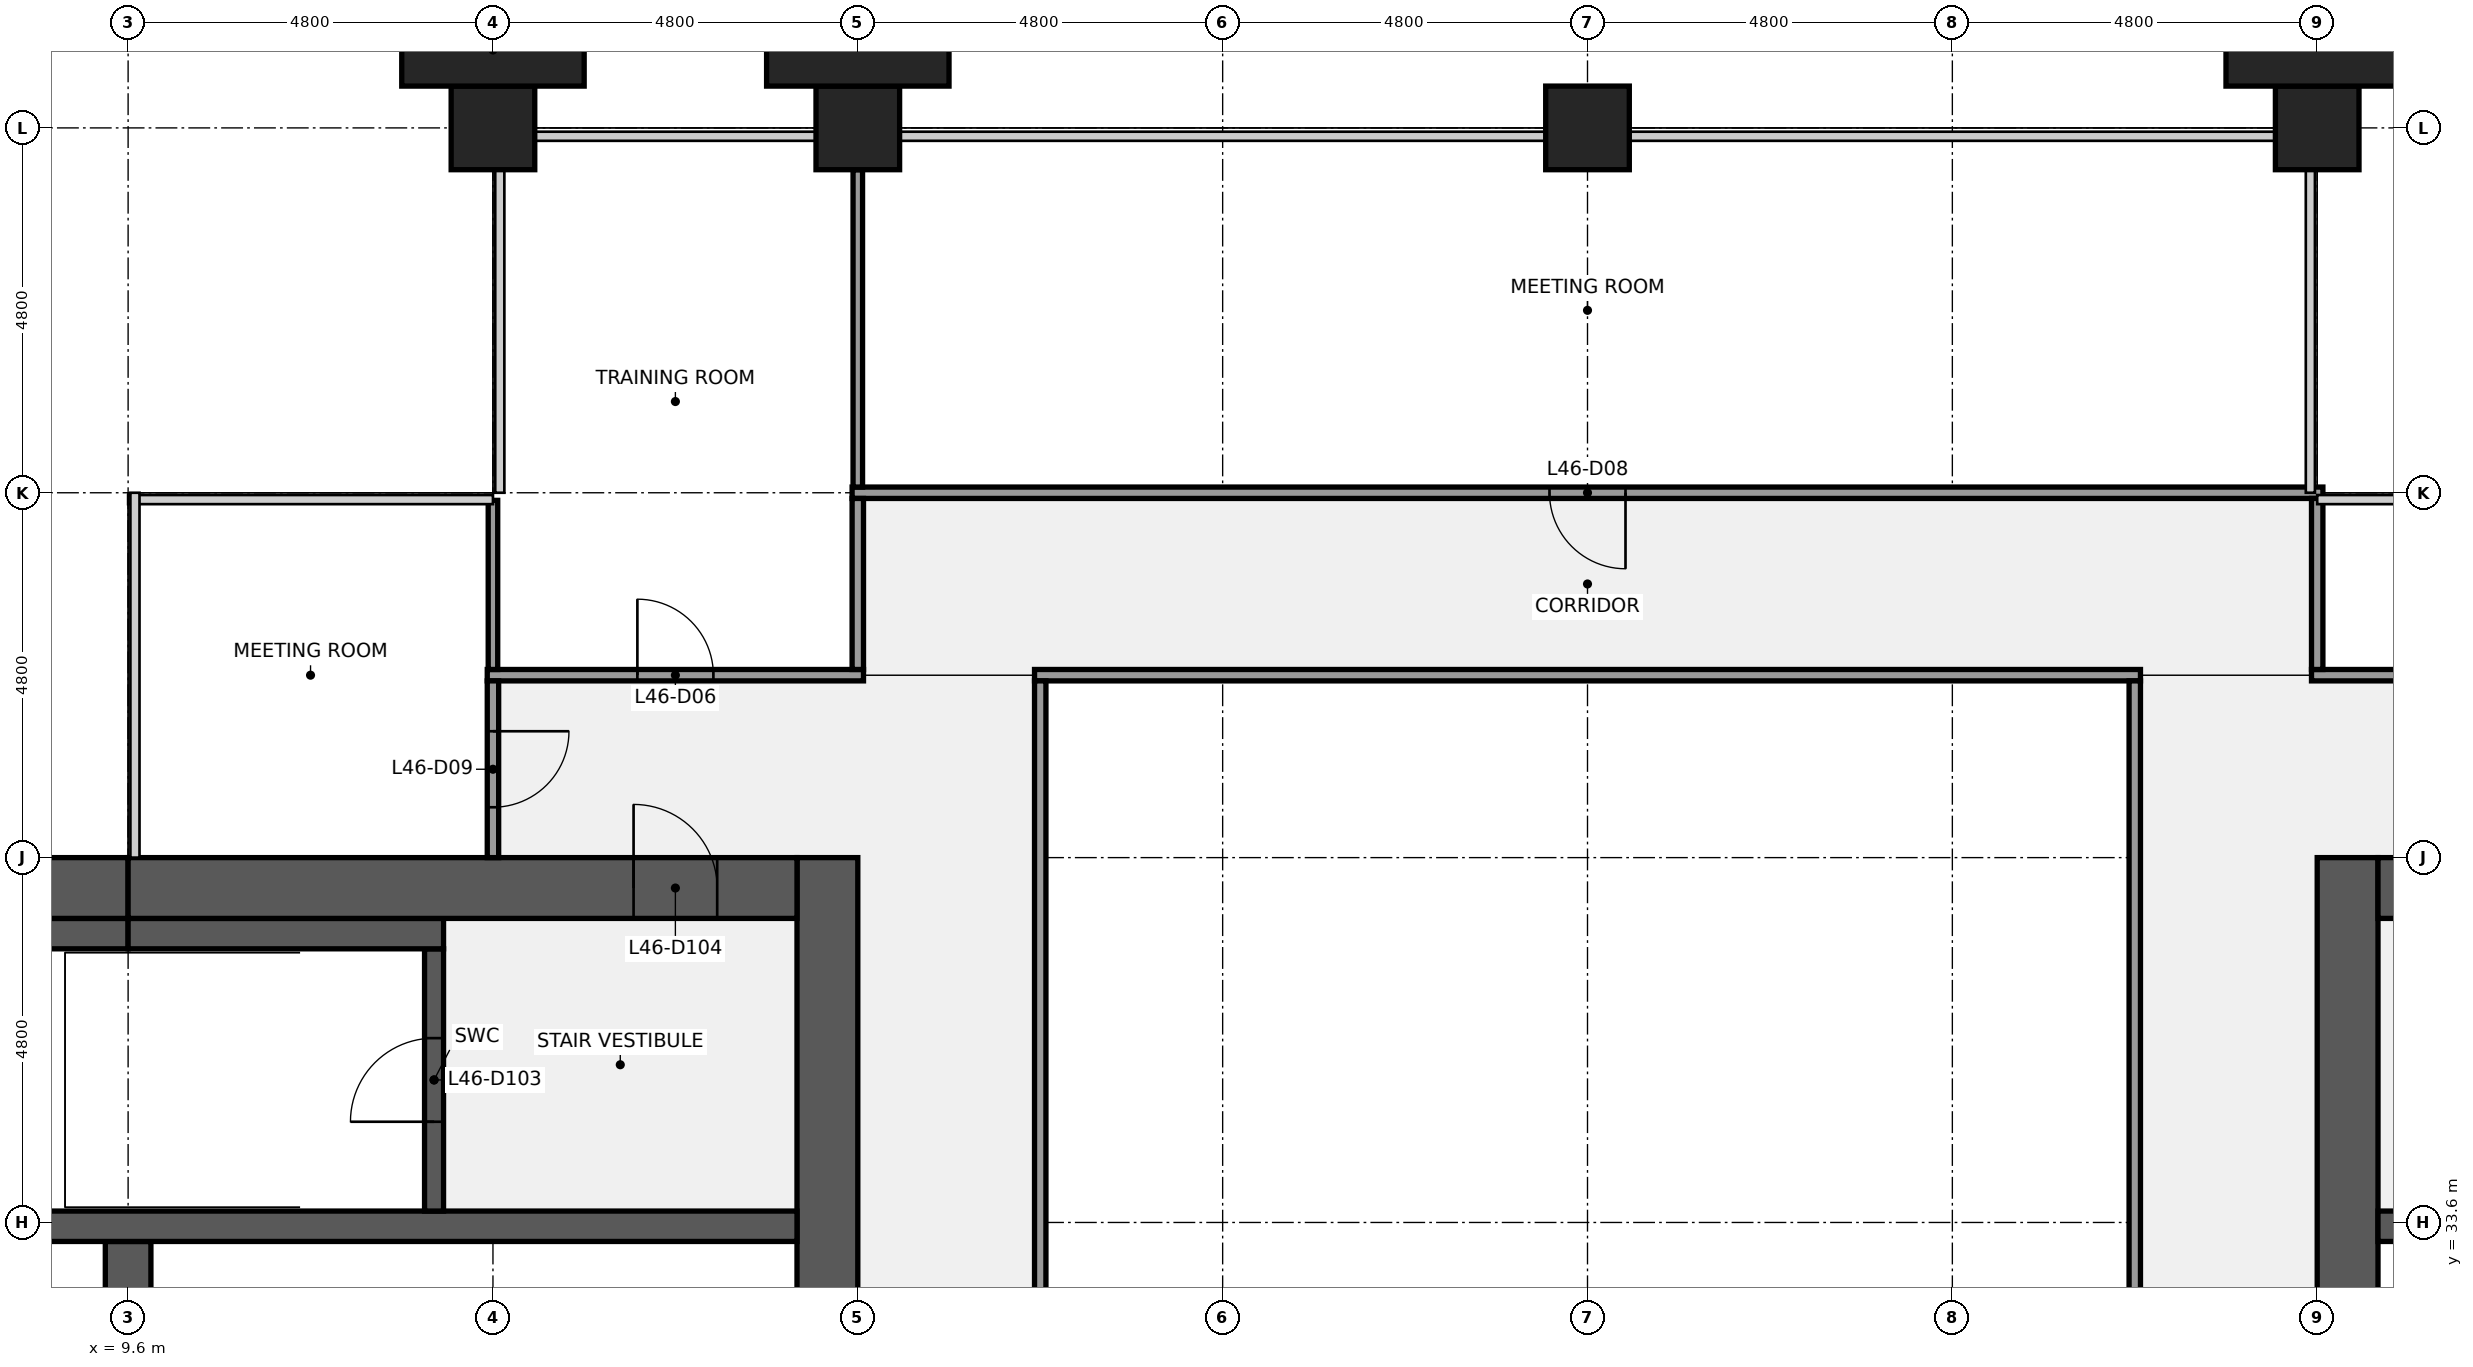
"""IFC4 building model, lengths in metres.
Left out: names, types, materials, properties, quantities, classifications, styles, units other than length and angle.
Written with IfcOpenShell. Run it as: python <this file> out.ifc"""

import sys

from ifc_helpers import new_model, si_unit, direction, frame, frame_2d, origin, origin_2d, place, context, subcontext, project, spatial, rectangle, extrude, element, fill, save


model = new_model("IFC4")
c1 = context("Model", 3, precision=1e-05, world=origin(), true_north=direction((0.0, 1.0)))
c2 = subcontext(c1, "Body", "Model", "MODEL_VIEW")
j1 = project(units=[si_unit("LENGTHUNIT", "METRE"), si_unit("PLANEANGLEUNIT", "RADIAN")], contexts=[c1])
p1 = place(None, origin())
s1 = spatial("IfcSite", under=j1, at=p1, CompositionType="ELEMENT")
p2 = place(p1, origin())
s2 = spatial("IfcBuilding", under=s1, at=p2, CompositionType="ELEMENT")
p3 = place(p2, frame((0.0, 0.0, 213.2)))
s3 = spatial("IfcBuildingStorey", under=s2, at=p3, CompositionType="ELEMENT", Elevation=213.2)
for number, where, z_axis, x_axis in (
    (1, (14.4, 48.0, 0.0), (0.0, 0.0, 1.0), (1.0, 0.0, 0.0)),
    (2, (19.2, 48.0, 0.0), (0.0, 0.0, 1.0), (1.0, 0.0, 0.0)),
    (3, (28.8, 48.0, 0.0), (0.0, 0.0, 1.0), (1.0, 0.0, 0.0)),
    (4, (38.4, 48.0, 0.0), (0.0, 0.0, 1.0), (1.0, 0.0, 0.0)),
):
    element("IfcColumn", number, at=place(p3, frame(where, z_axis=z_axis, x_axis=x_axis)), inside=s3, PredefinedType="COLUMN", context=c2, shape_type="SweptSolid", body=[
        extrude(rectangle(XDim=1.1, YDim=1.1, at=origin_2d()), origin(), (0.0, 0.0, 1.0), 4.0),
    ])
p4 = place(p3, frame((18.8, 38.4, 0.0), z_axis=(0.0, 0.0, 1.0), x_axis=(0.0, -1.0, 0.0)))
e5 = element("IfcWall", 5, at=p4, inside=s3, PredefinedType="SHEAR", context=c2, shape_type="SweptSolid", body=[
    extrude(rectangle(XDim=28.8, YDim=0.8, at=frame_2d((14.4, 0.0))), origin(), (0.0, 0.0, 1.0), 3.84),
])
p5 = place(p4, frame((18.3, 0.0, 0.0)))
e6 = element("IfcOpeningElement", 6, at=p5, cuts=e5, PredefinedType="OPENING", context=c2, shape_type="SweptSolid", body=[
    extrude(rectangle(XDim=1.8, YDim=2.1, at=frame_2d((0.9, 1.05))), frame((0.0, 0.41, 0.0), z_axis=(0.0, -1.0, 0.0), x_axis=(1.0, 0.0, 0.0)), (0.0, 0.0, 1.0), 0.82),
])
p6 = place(p4, frame((8.7, 0.0, 0.0)))
e7 = element("IfcOpeningElement", 7, at=p6, cuts=e5, PredefinedType="OPENING", context=c2, shape_type="SweptSolid", body=[
    extrude(rectangle(XDim=1.8, YDim=2.1, at=frame_2d((0.9, 1.05))), frame((0.0, 0.41, 0.0), z_axis=(0.0, -1.0, 0.0), x_axis=(1.0, 0.0, 0.0)), (0.0, 0.0, 1.0), 0.82),
])
p7 = place(p3, frame((9.6, 30.75, 0.0), z_axis=(0.0, 0.0, 1.0), x_axis=(0.0, 1.0, 0.0)))
e8 = element("IfcWall", 8, at=p7, inside=s3, PredefinedType="SHEAR", context=c2, shape_type="SweptSolid", body=[
    extrude(rectangle(XDim=2.6, YDim=0.6, at=frame_2d((1.3, 0.0))), origin(), (0.0, 0.0, 1.0), 3.84),
])
p8 = place(p3, frame((0.8, 33.55, 0.0), z_axis=(0.0, 0.0, 1.0), x_axis=(1.0, 0.0, 0.0)))
e9 = element("IfcWall", 9, at=p8, inside=s3, PredefinedType="SHEAR", context=c2, shape_type="SweptSolid", body=[
    extrude(rectangle(XDim=17.6, YDim=0.4, at=frame_2d((8.8, 0.0))), origin(), (0.0, 0.0, 1.0), 3.84),
])
p9 = place(p3, frame((13.625, 33.75, 0.0), z_axis=(0.0, 0.0, 1.0), x_axis=(0.0, 1.0, 0.0)))
e10 = element("IfcWall", 10, at=p9, inside=s3, PredefinedType="SHEAR", context=c2, shape_type="SweptSolid", body=[
    extrude(rectangle(XDim=3.45, YDim=0.25, at=frame_2d((1.725, 0.0))), origin(), (0.0, 0.0, 1.0), 3.84),
])
p10 = place(p9, frame((1.175, 0.0, 0.0)))
e11 = element("IfcOpeningElement", 11, at=p10, cuts=e10, PredefinedType="OPENING", context=c2, shape_type="SweptSolid", body=[
    extrude(rectangle(XDim=1.1, YDim=2.1, at=frame_2d((0.55, 1.05))), frame((0.0, 0.135, 0.0), z_axis=(0.0, -1.0, 0.0), x_axis=(1.0, 0.0, 0.0)), (0.0, 0.0, 1.0), 0.27),
])
p11 = place(p3, frame((6.25, 37.4, 0.0), z_axis=(0.0, 0.0, 1.0), x_axis=(1.0, 0.0, 0.0)))
e12 = element("IfcWall", 12, at=p11, inside=s3, PredefinedType="SHEAR", context=c2, shape_type="SweptSolid", body=[
    extrude(rectangle(XDim=3.35, YDim=0.4, at=frame_2d((1.675, 0.0))), origin(), (0.0, 0.0, 1.0), 3.84),
])
p12 = place(p3, frame((9.6, 37.4, 0.0), z_axis=(0.0, 0.0, 1.0), x_axis=(1.0, 0.0, 0.0)))
e13 = element("IfcWall", 13, at=p12, inside=s3, PredefinedType="SHEAR", context=c2, shape_type="SweptSolid", body=[
    extrude(rectangle(XDim=4.15, YDim=0.4, at=frame_2d((2.075, 0.0))), origin(), (0.0, 0.0, 1.0), 3.84),
])
p13 = place(p3, frame((0.8, 38.0, 0.0), z_axis=(0.0, 0.0, 1.0), x_axis=(1.0, 0.0, 0.0)))
e14 = element("IfcWall", 14, at=p13, inside=s3, PredefinedType="SHEAR", context=c2, shape_type="SweptSolid", body=[
    extrude(rectangle(XDim=8.8, YDim=0.8, at=frame_2d((4.4, 0.0))), origin(), (0.0, 0.0, 1.0), 3.84),
])
p14 = place(p13, frame((5.5, 0.0, 0.9)))
e15 = element("IfcOpeningElement", 15, at=p14, cuts=e14, PredefinedType="OPENING", context=c2, shape_type="SweptSolid", body=[
    extrude(rectangle(XDim=1.8, YDim=1.5, at=frame_2d((0.9, 0.75))), frame((0.0, 0.41, 0.0), z_axis=(0.0, -1.0, 0.0), x_axis=(1.0, 0.0, 0.0)), (0.0, 0.0, 1.0), 0.82),
])
p15 = place(p3, frame((9.6, 38.0, 0.0), z_axis=(0.0, 0.0, 1.0), x_axis=(1.0, 0.0, 0.0)))
e16 = element("IfcWall", 16, at=p15, inside=s3, PredefinedType="SHEAR", context=c2, shape_type="SweptSolid", body=[
    extrude(rectangle(XDim=8.8, YDim=0.8, at=frame_2d((4.4, 0.0))), origin(), (0.0, 0.0, 1.0), 3.84),
])
p16 = place(p15, frame((6.65, 0.0, 0.0)))
e17 = element("IfcOpeningElement", 17, at=p16, cuts=e16, PredefinedType="OPENING", context=c2, shape_type="SweptSolid", body=[
    extrude(rectangle(XDim=1.1, YDim=2.1, at=frame_2d((0.55, 1.05))), frame((0.0, 0.41, 0.0), z_axis=(0.0, -1.0, 0.0), x_axis=(1.0, 0.0, 0.0)), (0.0, 0.0, 1.0), 0.82),
])
p17 = place(p3, frame((38.8, 9.6, 0.0), z_axis=(0.0, 0.0, 1.0), x_axis=(0.0, 1.0, 0.0)))
e18 = element("IfcWall", 18, at=p17, inside=s3, PredefinedType="SHEAR", context=c2, shape_type="SweptSolid", body=[
    extrude(rectangle(XDim=28.8, YDim=0.8, at=frame_2d((14.4, 0.0))), origin(), (0.0, 0.0, 1.0), 3.84),
])
p18 = place(p17, frame((8.7, 0.0, 0.0)))
e19 = element("IfcOpeningElement", 19, at=p18, cuts=e18, PredefinedType="OPENING", context=c2, shape_type="SweptSolid", body=[
    extrude(rectangle(XDim=1.8, YDim=2.1, at=frame_2d((0.9, 1.05))), frame((0.0, 0.41, 0.0), z_axis=(0.0, -1.0, 0.0), x_axis=(1.0, 0.0, 0.0)), (0.0, 0.0, 1.0), 0.82),
])
p19 = place(p17, frame((18.3, 0.0, 0.0)))
e20 = element("IfcOpeningElement", 20, at=p19, cuts=e18, PredefinedType="OPENING", context=c2, shape_type="SweptSolid", body=[
    extrude(rectangle(XDim=1.8, YDim=2.1, at=frame_2d((0.9, 1.05))), frame((0.0, 0.41, 0.0), z_axis=(0.0, -1.0, 0.0), x_axis=(1.0, 0.0, 0.0)), (0.0, 0.0, 1.0), 0.82),
])
p20 = place(p3, frame((39.2, 33.55, 0.0), z_axis=(0.0, 0.0, 1.0), x_axis=(1.0, 0.0, 0.0)))
e21 = element("IfcWall", 21, at=p20, inside=s3, PredefinedType="SHEAR", context=c2, shape_type="SweptSolid", body=[
    extrude(rectangle(XDim=17.6, YDim=0.4, at=frame_2d((8.8, 0.0))), origin(), (0.0, 0.0, 1.0), 3.84),
])
p21 = place(p3, frame((39.2, 38.0, 0.0), z_axis=(0.0, 0.0, 1.0), x_axis=(1.0, 0.0, 0.0)))
e22 = element("IfcWall", 22, at=p21, inside=s3, PredefinedType="SHEAR", context=c2, shape_type="SweptSolid", body=[
    extrude(rectangle(XDim=8.8, YDim=0.8, at=frame_2d((4.4, 0.0))), origin(), (0.0, 0.0, 1.0), 3.84),
])
p22 = place(p21, frame((1.05, 0.0, 0.0)))
e23 = element("IfcOpeningElement", 23, at=p22, cuts=e22, PredefinedType="OPENING", context=c2, shape_type="SweptSolid", body=[
    extrude(rectangle(XDim=1.1, YDim=2.1, at=frame_2d((0.55, 1.05))), frame((0.0, 0.41, 0.0), z_axis=(0.0, -1.0, 0.0), x_axis=(1.0, 0.0, 0.0)), (0.0, 0.0, 1.0), 0.82),
])
p23 = place(p3, frame((14.325, 40.8, 0.0), z_axis=(0.0, 0.0, 1.0), x_axis=(1.0, 0.0, 0.0)))
e24 = element("IfcWall", 24, at=p23, inside=s3, PredefinedType="PARTITIONING", context=c2, shape_type="SweptSolid", body=[
    extrude(rectangle(XDim=4.95, YDim=0.15, at=frame_2d((2.475, 0.0))), origin(), (0.0, 0.0, 1.0), 2.87),
])
p24 = place(p23, frame((1.975, 0.0, 0.0)))
e25 = element("IfcOpeningElement", 25, at=p24, cuts=e24, PredefinedType="OPENING", context=c2, shape_type="SweptSolid", body=[
    extrude(rectangle(XDim=1.0, YDim=2.1, at=frame_2d((0.5, 1.05))), frame((0.0, 0.085, 0.0), z_axis=(0.0, -1.0, 0.0), x_axis=(1.0, 0.0, 0.0)), (0.0, 0.0, 1.0), 0.17),
])
p25 = place(p3, frame((21.525, 40.8, 0.0), z_axis=(0.0, 0.0, 1.0), x_axis=(1.0, 0.0, 0.0)))
e26 = element("IfcWall", 26, at=p25, inside=s3, PredefinedType="PARTITIONING", context=c2, shape_type="SweptSolid", body=[
    extrude(rectangle(XDim=14.55, YDim=0.15, at=frame_2d((7.275, 0.0))), origin(), (0.0, 0.0, 1.0), 2.87),
])
p26 = place(p3, frame((38.325, 40.8, 0.0), z_axis=(0.0, 0.0, 1.0), x_axis=(1.0, 0.0, 0.0)))
e27 = element("IfcWall", 27, at=p26, inside=s3, PredefinedType="PARTITIONING", context=c2, shape_type="SweptSolid", body=[
    extrude(rectangle(XDim=4.95, YDim=0.15, at=frame_2d((2.475, 0.0))), origin(), (0.0, 0.0, 1.0), 2.87),
])
p27 = place(p26, frame((1.975, 0.0, 0.0)))
e28 = element("IfcOpeningElement", 28, at=p27, cuts=e27, PredefinedType="OPENING", context=c2, shape_type="SweptSolid", body=[
    extrude(rectangle(XDim=1.0, YDim=2.1, at=frame_2d((0.5, 1.05))), frame((0.0, 0.085, 0.0), z_axis=(0.0, -1.0, 0.0), x_axis=(1.0, 0.0, 0.0)), (0.0, 0.0, 1.0), 0.17),
])
p28 = place(p3, frame((19.125, 43.2, 0.0), z_axis=(0.0, 0.0, 1.0), x_axis=(1.0, 0.0, 0.0)))
e29 = element("IfcWall", 29, at=p28, inside=s3, PredefinedType="PARTITIONING", context=c2, shape_type="SweptSolid", body=[
    extrude(rectangle(XDim=19.35, YDim=0.15, at=frame_2d((9.675, 0.0))), origin(), (0.0, 0.0, 1.0), 2.87),
])
p29 = place(p28, frame((9.175, 0.0, 0.0)))
e30 = element("IfcOpeningElement", 30, at=p29, cuts=e29, PredefinedType="OPENING", context=c2, shape_type="SweptSolid", body=[
    extrude(rectangle(XDim=1.0, YDim=2.1, at=frame_2d((0.5, 1.05))), frame((0.0, 0.085, 0.0), z_axis=(0.0, -1.0, 0.0), x_axis=(1.0, 0.0, 0.0)), (0.0, 0.0, 1.0), 0.17),
])
p30 = place(p3, frame((14.4, 40.875, 0.0), z_axis=(0.0, 0.0, 1.0), x_axis=(0.0, 1.0, 0.0)))
e31 = element("IfcWall", 31, at=p30, inside=s3, PredefinedType="PARTITIONING", context=c2, shape_type="SweptSolid", body=[
    extrude(rectangle(XDim=2.225, YDim=0.125, at=frame_2d((1.113, 0.0))), origin(), (0.0, 0.0, 1.0), 2.87),
])
p31 = place(p3, frame((14.4, 38.4, 0.0), z_axis=(0.0, 0.0, 1.0), x_axis=(0.0, 1.0, 0.0)))
e32 = element("IfcWall", 32, at=p31, inside=s3, PredefinedType="PARTITIONING", context=c2, shape_type="SweptSolid", body=[
    extrude(rectangle(XDim=2.325, YDim=0.15, at=frame_2d((1.163, 0.0))), origin(), (0.0, 0.0, 1.0), 2.87),
])
p32 = place(p31, frame((0.663, 0.0, 0.0)))
e33 = element("IfcOpeningElement", 33, at=p32, cuts=e32, PredefinedType="OPENING", context=c2, shape_type="SweptSolid", body=[
    extrude(rectangle(XDim=1.0, YDim=2.1, at=frame_2d((0.5, 1.05))), frame((0.0, 0.085, 0.0), z_axis=(0.0, -1.0, 0.0), x_axis=(1.0, 0.0, 0.0)), (0.0, 0.0, 1.0), 0.17),
])
p33 = place(p3, frame((19.2, 43.275, 0.0), z_axis=(0.0, 0.0, 1.0), x_axis=(0.0, 1.0, 0.0)))
e34 = element("IfcWall", 34, at=p33, inside=s3, PredefinedType="PARTITIONING", context=c2, shape_type="SweptSolid", body=[
    extrude(rectangle(XDim=4.175, YDim=0.125, at=frame_2d((2.087, 0.0))), origin(), (0.0, 0.0, 1.0), 2.87),
])
p34 = place(p3, frame((19.2, 40.875, 0.0), z_axis=(0.0, 0.0, 1.0), x_axis=(0.0, 1.0, 0.0)))
e35 = element("IfcWall", 35, at=p34, inside=s3, PredefinedType="PARTITIONING", context=c2, shape_type="SweptSolid", body=[
    extrude(rectangle(XDim=2.25, YDim=0.15, at=frame_2d((1.125, 0.0))), origin(), (0.0, 0.0, 1.0), 2.87),
])
p35 = place(p3, frame((21.6, 21.663, 0.0), z_axis=(0.0, 0.0, 1.0), x_axis=(0.0, 1.0, 0.0)))
e36 = element("IfcWall", 36, at=p35, inside=s3, PredefinedType="PARTITIONING", context=c2, shape_type="SweptSolid", body=[
    extrude(rectangle(XDim=19.062, YDim=0.15, at=frame_2d((9.531, 0.0))), origin(), (0.0, 0.0, 1.0), 2.87),
])
p36 = place(p35, frame((9.031, 0.0, 0.0)))
e37 = element("IfcOpeningElement", 37, at=p36, cuts=e36, PredefinedType="OPENING", context=c2, shape_type="SweptSolid", body=[
    extrude(rectangle(XDim=1.0, YDim=2.1, at=frame_2d((0.5, 1.05))), frame((0.0, 0.085, 0.0), z_axis=(0.0, -1.0, 0.0), x_axis=(1.0, 0.0, 0.0)), (0.0, 0.0, 1.0), 0.17),
])
p37 = place(p3, frame((36.0, 21.663, 0.0), z_axis=(0.0, 0.0, 1.0), x_axis=(0.0, 1.0, 0.0)))
e38 = element("IfcWall", 38, at=p37, inside=s3, PredefinedType="PARTITIONING", context=c2, shape_type="SweptSolid", body=[
    extrude(rectangle(XDim=19.062, YDim=0.15, at=frame_2d((9.531, 0.0))), origin(), (0.0, 0.0, 1.0), 2.87),
])
p38 = place(p3, frame((38.4, 40.875, 0.0), z_axis=(0.0, 0.0, 1.0), x_axis=(0.0, 1.0, 0.0)))
e39 = element("IfcWall", 39, at=p38, inside=s3, PredefinedType="PARTITIONING", context=c2, shape_type="SweptSolid", body=[
    extrude(rectangle(XDim=2.25, YDim=0.15, at=frame_2d((1.125, 0.0))), origin(), (0.0, 0.0, 1.0), 2.87),
])
for number, where, z_axis, x_axis in (
    (40, (14.4, 49.025, 0.0), (0.0, 0.0, 1.0), (1.0, 0.0, 0.0)),
    (41, (19.2, 49.025, 0.0), (0.0, 0.0, 1.0), (1.0, 0.0, 0.0)),
    (42, (38.4, 49.025, 0.0), (0.0, 0.0, 1.0), (1.0, 0.0, 0.0)),
):
    element("IfcColumn", number, at=place(p3, frame(where, z_axis=z_axis, x_axis=x_axis)), inside=s3, PredefinedType="PILASTER", context=c2, shape_type="SweptSolid", body=[
        extrude(rectangle(XDim=2.4, YDim=0.95, at=origin_2d()), origin(), (0.0, 0.0, 1.0), 4.0),
    ])
p39 = place(p10, origin())
e43 = element("IfcDoor", 43, at=p39, inside=s3, OperationType="SINGLE_SWING_LEFT", PredefinedType="DOOR", context=c2, shape_type="SweptSolid", body=[
    extrude(rectangle(XDim=1.1, YDim=2.1, at=frame_2d((0.55, 1.05))), frame((0.0, 0.025, 0.0), z_axis=(0.0, -1.0, 0.0), x_axis=(1.0, 0.0, 0.0)), (0.0, 0.0, 1.0), 0.05),
])
fill(e11, e43)
p40 = place(p16, origin())
e44 = element("IfcDoor", 44, at=p40, inside=s3, OperationType="SINGLE_SWING_LEFT", PredefinedType="DOOR", context=c2, shape_type="SweptSolid", body=[
    extrude(rectangle(XDim=1.1, YDim=2.1, at=frame_2d((0.55, 1.05))), frame((0.0, 0.025, 0.0), z_axis=(0.0, -1.0, 0.0), x_axis=(1.0, 0.0, 0.0)), (0.0, 0.0, 1.0), 0.05),
])
fill(e17, e44)
p41 = place(p24, origin())
e45 = element("IfcDoor", 45, at=p41, inside=s3, OperationType="SINGLE_SWING_LEFT", PredefinedType="DOOR", context=c2, shape_type="SweptSolid", body=[
    extrude(rectangle(XDim=1.0, YDim=2.1, at=frame_2d((0.5, 1.05))), frame((0.0, 0.025, 0.0), z_axis=(0.0, -1.0, 0.0), x_axis=(1.0, 0.0, 0.0)), (0.0, 0.0, 1.0), 0.05),
])
fill(e25, e45)
p42 = place(p29, origin())
e46 = element("IfcDoor", 46, at=p42, inside=s3, OperationType="SINGLE_SWING_RIGHT", PredefinedType="DOOR", context=c2, shape_type="SweptSolid", body=[
    extrude(rectangle(XDim=1.0, YDim=2.1, at=frame_2d((0.5, 1.05))), frame((0.0, 0.025, 0.0), z_axis=(0.0, -1.0, 0.0), x_axis=(1.0, 0.0, 0.0)), (0.0, 0.0, 1.0), 0.05),
])
fill(e30, e46)
p43 = place(p32, origin())
e47 = element("IfcDoor", 47, at=p43, inside=s3, OperationType="SINGLE_SWING_RIGHT", PredefinedType="DOOR", context=c2, shape_type="SweptSolid", body=[
    extrude(rectangle(XDim=1.0, YDim=2.1, at=frame_2d((0.5, 1.05))), frame((0.0, 0.025, 0.0), z_axis=(0.0, -1.0, 0.0), x_axis=(1.0, 0.0, 0.0)), (0.0, 0.0, 1.0), 0.05),
])
fill(e33, e47)
save(model, sys.argv[1])
